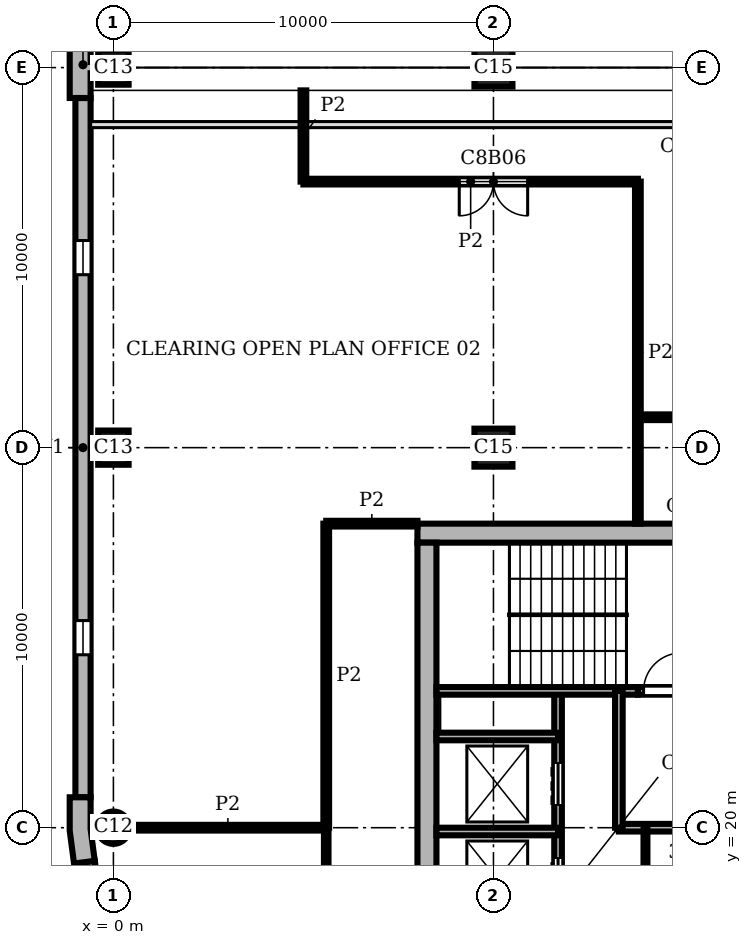
"""IFC4 building model, lengths in metres.
Left out: names, types, materials, properties, quantities, classifications, styles, units other than length and angle.
Written with IfcOpenShell. Run it as: python <this file> out.ifc"""

import sys

from ifc_helpers import new_model, si_unit, direction, frame, frame_2d, origin, origin_2d, place, context, subcontext, project, spatial, polyline, rectangle, circle, outline, extrude, element, fill, save


model = new_model("IFC4")
c1 = context("Model", 3, precision=1e-05, world=origin(), true_north=direction((0.0, 1.0)))
c2 = subcontext(c1, "Body", "Model", "MODEL_VIEW")
j1 = project(units=[si_unit("LENGTHUNIT", "METRE"), si_unit("PLANEANGLEUNIT", "RADIAN")], contexts=[c1])
p1 = place(None, origin())
s1 = spatial("IfcSite", under=j1, at=p1, CompositionType="ELEMENT")
p2 = place(p1, origin())
s2 = spatial("IfcBuilding", under=s1, at=p2, CompositionType="ELEMENT")
p3 = place(p2, frame((0.0, 0.0, 329.4)))
s3 = spatial("IfcBuildingStorey", under=s2, at=p3, CompositionType="ELEMENT", Elevation=329.4)
for number, where, z_axis, x_axis in (
    (1, (0.0, 40.0, 0.0), (0.0, 0.0, 1.0), (0.0, 1.0, 0.0)),
    (2, (0.0, 30.0, 0.0), (0.0, 0.0, 1.0), (0.0, 1.0, 0.0)),
):
    element("IfcColumn", number, at=place(p3, frame(where, z_axis=z_axis, x_axis=x_axis)), inside=s3, PredefinedType="COLUMN", context=c2, shape_type="SweptSolid", body=[
        extrude(rectangle(XDim=0.9, YDim=0.8, at=origin_2d()), origin(), (0.0, 0.0, 1.0), 3.9),
    ])
p4 = place(p3, frame((0.0, 20.0, 0.0), z_axis=(0.0, 0.0, 1.0), x_axis=(1.0, 0.0, 0.0)))
e3 = element("IfcColumn", 3, at=p4, inside=s3, PredefinedType="COLUMN", context=c2, shape_type="SweptSolid", body=[
    extrude(circle(Radius=0.425, at=origin_2d()), origin(), (0.0, 0.0, 1.0), 3.9),
])
for number, where, z_axis, x_axis in (
    (4, (10.0, 30.0, 0.0), (0.0, 0.0, 1.0), (1.0, 0.0, 0.0)),
    (5, (10.0, 40.0, 0.0), (0.0, 0.0, 1.0), (1.0, 0.0, 0.0)),
):
    element("IfcColumn", number, at=place(p3, frame(where, z_axis=z_axis, x_axis=x_axis)), inside=s3, PredefinedType="COLUMN", context=c2, shape_type="SweptSolid", body=[
        extrude(rectangle(XDim=1.0, YDim=1.0, at=origin_2d()), origin(), (0.0, 0.0, 1.0), 3.9),
    ])
p5 = place(p3, frame((28.0, 27.75, 0.0), z_axis=(0.0, 0.0, 1.0), x_axis=(-1.0, 0.0, 0.0)))
e6 = element("IfcWall", 6, at=p5, inside=s3, PredefinedType="SHEAR", context=c2, shape_type="SweptSolid", body=[
    extrude(rectangle(XDim=20.0, YDim=0.5, at=frame_2d((10.0, 0.0))), origin(), (0.0, 0.0, 1.0), 3.9),
])
p6 = place(p3, frame((8.25, 27.5, 0.0), z_axis=(0.0, 0.0, 1.0), x_axis=(0.0, -1.0, 0.0)))
e7 = element("IfcWall", 7, at=p6, inside=s3, PredefinedType="SHEAR", context=c2, shape_type="SweptSolid", body=[
    extrude(rectangle(XDim=19.0, YDim=0.5, at=frame_2d((9.5, 0.0))), origin(), (0.0, 0.0, 1.0), 3.9),
])
p7 = place(p3, origin())
e8 = element("IfcWall", 8, at=p7, inside=s3, PredefinedType="SOLIDWALL", context=c2, shape_type="SweptSolid", body=[
    extrude(outline(polyline([(-0.6, 39.2), (-0.6, 39.85), (-0.45, 39.85), (-0.45, 40.15), (-0.6, 40.15), (-0.6, 40.8), (-1.0, 40.8), (-1.15, 40.8), (-1.15, 40.0), (-1.15, 39.2), (-1.0, 39.2), (-0.6, 39.2)])), origin(), (0.0, 0.0, 1.0), 3.9),
])
e9 = element("IfcWall", 9, at=p7, inside=s3, PredefinedType="SOLIDWALL", context=c2, shape_type="SweptSolid", body=[
    extrude(outline(polyline([(-1.0, 20.8), (-1.15, 20.8), (-1.15, 19.925), (-1.036, 19.057), (-0.887, 19.076), (-0.49, 19.128), (-0.6, 19.961), (-0.6, 20.8), (-1.0, 20.8)])), origin(), (0.0, 0.0, 1.0), 3.9),
])
p8 = place(p3, frame((-0.8, 39.2, 0.0), z_axis=(0.0, 0.0, 1.0), x_axis=(0.0, -1.0, 0.0)))
e10 = element("IfcWall", 10, at=p8, inside=s3, PredefinedType="SOLIDWALL", context=c2, shape_type="SweptSolid", body=[
    extrude(rectangle(XDim=18.4, YDim=0.4, at=frame_2d((9.2, 0.0))), origin(), (0.0, 0.0, 1.0), 3.9),
])
p9 = place(p8, frame((3.75, 0.0, 0.9)))
e11 = element("IfcOpeningElement", 11, at=p9, cuts=e10, PredefinedType="OPENING", context=c2, shape_type="SweptSolid", body=[
    extrude(rectangle(XDim=0.9, YDim=2.35, at=frame_2d((0.45, 1.175))), frame((0.0, 0.21, 0.0), z_axis=(0.0, -1.0, 0.0), x_axis=(1.0, 0.0, 0.0)), (0.0, 0.0, 1.0), 0.42),
])
p10 = place(p8, frame((13.75, 0.0, 0.9)))
e12 = element("IfcOpeningElement", 12, at=p10, cuts=e10, PredefinedType="OPENING", context=c2, shape_type="SweptSolid", body=[
    extrude(rectangle(XDim=0.9, YDim=2.35, at=frame_2d((0.45, 1.175))), frame((0.0, 0.21, 0.0), z_axis=(0.0, -1.0, 0.0), x_axis=(1.0, 0.0, 0.0)), (0.0, 0.0, 1.0), 0.42),
])
p11 = place(p3, frame((-0.689, 19.102, 0.0), z_axis=(0.0, 0.0, 1.0), x_axis=(0.130514280502, -0.991446429508, 0.0)))
e13 = element("IfcWall", 13, at=p11, inside=s3, PredefinedType="SOLIDWALL", context=c2, shape_type="SweptSolid", body=[
    extrude(rectangle(XDim=4.121, YDim=0.4, at=frame_2d((2.061, 0.0))), origin(), (0.0, 0.0, 1.0), 3.9),
])
p12 = place(p11, frame((1.611, 0.0, 0.9)))
e14 = element("IfcOpeningElement", 14, at=p12, cuts=e13, PredefinedType="OPENING", context=c2, shape_type="SweptSolid", body=[
    extrude(rectangle(XDim=0.9, YDim=2.35, at=frame_2d((0.45, 1.175))), frame((0.0, 0.21, 0.0), z_axis=(0.0, -1.0, 0.0), x_axis=(1.0, 0.0, 0.0)), (0.0, 0.0, 1.0), 0.42),
])
p13 = place(p3, frame((8.5, 19.9, 0.0), z_axis=(0.0, 0.0, 1.0), x_axis=(1.0, 0.0, 0.0)))
e15 = element("IfcWall", 15, at=p13, inside=s3, PredefinedType="SHEAR", context=c2, shape_type="SweptSolid", body=[
    extrude(rectangle(XDim=3.2, YDim=0.2, at=frame_2d((1.6, 0.0))), origin(), (0.0, 0.0, 1.0), 3.45),
])
p14 = place(p3, frame((13.3, 20.0, 0.0), z_axis=(0.0, 0.0, 1.0), x_axis=(1.0, 0.0, 0.0)))
e16 = element("IfcWall", 16, at=p14, inside=s3, PredefinedType="SHEAR", context=c2, shape_type="SweptSolid", body=[
    extrude(rectangle(XDim=4.7, YDim=0.2, at=frame_2d((2.35, 0.0))), origin(), (0.0, 0.0, 1.0), 3.45),
])
p15 = place(p3, frame((8.5, 22.4, 0.0), z_axis=(0.0, 0.0, 1.0), x_axis=(1.0, 0.0, 0.0)))
e17 = element("IfcWall", 17, at=p15, inside=s3, PredefinedType="SHEAR", context=c2, shape_type="SweptSolid", body=[
    extrude(rectangle(XDim=3.2, YDim=0.2, at=frame_2d((1.6, 0.0))), origin(), (0.0, 0.0, 1.0), 3.45),
])
p16 = place(p3, frame((8.5, 23.6, 0.0), z_axis=(0.0, 0.0, 1.0), x_axis=(1.0, 0.0, 0.0)))
e18 = element("IfcWall", 18, at=p16, inside=s3, PredefinedType="SHEAR", context=c2, shape_type="SweptSolid", body=[
    extrude(rectangle(XDim=5.3, YDim=0.2, at=frame_2d((2.65, 0.0))), origin(), (0.0, 0.0, 1.0), 3.45),
])
p17 = place(p3, frame((13.8, 23.6, 0.0), z_axis=(0.0, 0.0, 1.0), x_axis=(1.0, 0.0, 0.0)))
e19 = element("IfcWall", 19, at=p17, inside=s3, PredefinedType="SHEAR", context=c2, shape_type="SweptSolid", body=[
    extrude(rectangle(XDim=13.7, YDim=0.2, at=frame_2d((6.85, 0.0))), origin(), (0.0, 0.0, 1.0), 3.45),
])
p18 = place(p17, frame((2.4, 0.0, 0.0)))
e20 = element("IfcOpeningElement", 20, at=p18, cuts=e19, PredefinedType="OPENING", context=c2, shape_type="SweptSolid", body=[
    extrude(rectangle(XDim=1.1, YDim=2.1, at=frame_2d((0.55, 1.05))), frame((0.0, 0.11, 0.0), z_axis=(0.0, -1.0, 0.0), x_axis=(1.0, 0.0, 0.0)), (0.0, 0.0, 1.0), 0.22),
])
p19 = place(p17, frame((4.9, 0.0, 0.0)))
e21 = element("IfcOpeningElement", 21, at=p19, cuts=e19, PredefinedType="OPENING", context=c2, shape_type="SweptSolid", body=[
    extrude(rectangle(XDim=1.1, YDim=2.1, at=frame_2d((0.55, 1.05))), frame((0.0, 0.11, 0.0), z_axis=(0.0, -1.0, 0.0), x_axis=(1.0, 0.0, 0.0)), (0.0, 0.0, 1.0), 0.22),
])
p20 = place(p17, frame((0.15, 0.0, 0.0)))
e22 = element("IfcOpeningElement", 22, at=p20, cuts=e19, PredefinedType="OPENING", context=c2, shape_type="SweptSolid", body=[
    extrude(rectangle(XDim=1.0, YDim=2.1, at=frame_2d((0.5, 1.05))), frame((0.0, 0.11, 0.0), z_axis=(0.0, -1.0, 0.0), x_axis=(1.0, 0.0, 0.0)), (0.0, 0.0, 1.0), 0.22),
])
p21 = place(p3, frame((11.7, 12.4, 0.0), z_axis=(0.0, 0.0, 1.0), x_axis=(0.0, 1.0, 0.0)))
e23 = element("IfcWall", 23, at=p21, inside=s3, PredefinedType="SHEAR", context=c2, shape_type="SweptSolid", body=[
    extrude(rectangle(XDim=11.2, YDim=0.2, at=frame_2d((5.6, 0.0))), origin(), (0.0, 0.0, 1.0), 3.45),
])
p22 = place(p21, frame((0.7, 0.0, 0.0)))
e24 = element("IfcOpeningElement", 24, at=p22, cuts=e23, PredefinedType="OPENING", context=c2, shape_type="SweptSolid", body=[
    extrude(rectangle(XDim=1.1, YDim=2.1, at=frame_2d((0.55, 1.05))), frame((0.0, 0.11, 0.0), z_axis=(0.0, -1.0, 0.0), x_axis=(1.0, 0.0, 0.0)), (0.0, 0.0, 1.0), 0.22),
])
p23 = place(p21, frame((3.2, 0.0, 0.0)))
e25 = element("IfcOpeningElement", 25, at=p23, cuts=e23, PredefinedType="OPENING", context=c2, shape_type="SweptSolid", body=[
    extrude(rectangle(XDim=1.1, YDim=2.1, at=frame_2d((0.55, 1.05))), frame((0.0, 0.11, 0.0), z_axis=(0.0, -1.0, 0.0), x_axis=(1.0, 0.0, 0.0)), (0.0, 0.0, 1.0), 0.22),
])
p24 = place(p21, frame((5.7, 0.0, 0.0)))
e26 = element("IfcOpeningElement", 26, at=p24, cuts=e23, PredefinedType="OPENING", context=c2, shape_type="SweptSolid", body=[
    extrude(rectangle(XDim=1.1, YDim=2.1, at=frame_2d((0.55, 1.05))), frame((0.0, 0.11, 0.0), z_axis=(0.0, -1.0, 0.0), x_axis=(1.0, 0.0, 0.0)), (0.0, 0.0, 1.0), 0.22),
])
p25 = place(p21, frame((8.2, 0.0, 0.0)))
e27 = element("IfcOpeningElement", 27, at=p25, cuts=e23, PredefinedType="OPENING", context=c2, shape_type="SweptSolid", body=[
    extrude(rectangle(XDim=1.1, YDim=2.1, at=frame_2d((0.55, 1.05))), frame((0.0, 0.11, 0.0), z_axis=(0.0, -1.0, 0.0), x_axis=(1.0, 0.0, 0.0)), (0.0, 0.0, 1.0), 0.22),
])
p26 = place(p3, frame((13.3, 20.0, 0.0), z_axis=(0.0, 0.0, 1.0), x_axis=(0.0, 1.0, 0.0)))
e28 = element("IfcWall", 28, at=p26, inside=s3, PredefinedType="SHEAR", context=c2, shape_type="SweptSolid", body=[
    extrude(rectangle(XDim=3.6, YDim=0.2, at=frame_2d((1.8, 0.0))), origin(), (0.0, 0.0, 1.0), 3.45),
])
p27 = place(p3, frame((14.0, 16.2, 0.0), z_axis=(0.0, 0.0, 1.0), x_axis=(0.0, 1.0, 0.0)))
e29 = element("IfcWall", 29, at=p27, inside=s3, PredefinedType="PARTITIONING", context=c2, shape_type="SweptSolid", body=[
    extrude(rectangle(XDim=3.8, YDim=0.1, at=frame_2d((1.9, 0.0))), origin(), (0.0, 0.0, 1.0), 3.45),
])
p28 = place(p3, frame((5.0, 37.0, 0.0), z_axis=(0.0, 0.0, 1.0), x_axis=(0.0, 1.0, 0.0)))
e30 = element("IfcWall", 30, at=p28, inside=s3, PredefinedType="PARTITIONING", context=c2, shape_type="SweptSolid", body=[
    extrude(rectangle(XDim=2.4, YDim=0.15, at=frame_2d((1.2, 0.0))), origin(), (0.0, 0.0, 1.0), 3.45),
])
p29 = place(p3, frame((5.6, 20.0, 0.0), z_axis=(0.0, 0.0, 1.0), x_axis=(0.0, 1.0, 0.0)))
e31 = element("IfcWall", 31, at=p29, inside=s3, PredefinedType="PARTITIONING", context=c2, shape_type="SweptSolid", body=[
    extrude(rectangle(XDim=8.0, YDim=0.15, at=frame_2d((4.0, 0.0))), origin(), (0.0, 0.0, 1.0), 3.45),
])
p30 = place(p3, frame((13.8, 28.0, 0.0), z_axis=(0.0, 0.0, 1.0), x_axis=(0.0, 1.0, 0.0)))
e32 = element("IfcWall", 32, at=p30, inside=s3, PredefinedType="PARTITIONING", context=c2, shape_type="SweptSolid", body=[
    extrude(rectangle(XDim=9.0, YDim=0.15, at=frame_2d((4.5, 0.0))), origin(), (0.0, 0.0, 1.0), 3.45),
])
p31 = place(p3, frame((0.425, 20.0, 0.0), z_axis=(0.0, 0.0, 1.0), x_axis=(1.0, 0.0, 0.0)))
e33 = element("IfcWall", 33, at=p31, inside=s3, PredefinedType="PARTITIONING", context=c2, shape_type="SweptSolid", body=[
    extrude(rectangle(XDim=5.175, YDim=0.15, at=frame_2d((2.587, 0.0))), origin(), (0.0, 0.0, 1.0), 3.45),
])
p32 = place(p3, frame((5.6, 28.0, 0.0), z_axis=(0.0, 0.0, 1.0), x_axis=(1.0, 0.0, 0.0)))
e34 = element("IfcWall", 34, at=p32, inside=s3, PredefinedType="PARTITIONING", context=c2, shape_type="SweptSolid", body=[
    extrude(rectangle(XDim=2.4, YDim=0.15, at=frame_2d((1.2, 0.0))), origin(), (0.0, 0.0, 1.0), 3.45),
])
p33 = place(p3, frame((13.802, 30.8, 0.0), z_axis=(0.0, 0.0, 1.0), x_axis=(1.0, 0.0, 0.0)))
e35 = element("IfcWall", 35, at=p33, inside=s3, PredefinedType="PARTITIONING", context=c2, shape_type="SweptSolid", body=[
    extrude(rectangle(XDim=16.798, YDim=0.15, at=frame_2d((8.399, 0.0))), origin(), (0.0, 0.0, 1.0), 3.45),
])
p34 = place(p33, frame((7.85, 0.0, 0.0)))
e36 = element("IfcOpeningElement", 36, at=p34, cuts=e35, PredefinedType="OPENING", context=c2, shape_type="SweptSolid", body=[
    extrude(rectangle(XDim=1.0, YDim=2.1, at=frame_2d((0.5, 1.05))), frame((0.0, 0.085, 0.0), z_axis=(0.0, -1.0, 0.0), x_axis=(1.0, 0.0, 0.0)), (0.0, 0.0, 1.0), 0.17),
])
p35 = place(p3, frame((5.0, 37.0, 0.0), z_axis=(0.0, 0.0, 1.0), x_axis=(1.0, 0.0, 0.0)))
e37 = element("IfcWall", 37, at=p35, inside=s3, PredefinedType="PARTITIONING", context=c2, shape_type="SweptSolid", body=[
    extrude(rectangle(XDim=8.8, YDim=0.15, at=frame_2d((4.4, 0.0))), origin(), (0.0, 0.0, 1.0), 3.45),
])
p36 = place(p35, frame((4.1, 0.0, 0.0)))
e38 = element("IfcOpeningElement", 38, at=p36, cuts=e37, PredefinedType="OPENING", context=c2, shape_type="SweptSolid", body=[
    extrude(rectangle(XDim=1.8, YDim=2.1, at=frame_2d((0.9, 1.05))), frame((0.0, 0.085, 0.0), z_axis=(0.0, -1.0, 0.0), x_axis=(1.0, 0.0, 0.0)), (0.0, 0.0, 1.0), 0.17),
])
p37 = place(p3, frame((5.6, 15.0, 0.0), z_axis=(0.0, 0.0, 1.0), x_axis=(0.0, 1.0, 0.0)))
e39 = element("IfcWall", 39, at=p37, inside=s3, PredefinedType="PARTITIONING", context=c2, shape_type="SweptSolid", body=[
    extrude(rectangle(XDim=5.0, YDim=0.12, at=frame_2d((2.5, 0.0))), origin(), (0.0, 0.0, 1.0), 3.45),
])
p38 = place(p37, frame((1.6, 0.0, 0.0)))
e40 = element("IfcOpeningElement", 40, at=p38, cuts=e39, PredefinedType="OPENING", context=c2, shape_type="SweptSolid", body=[
    extrude(rectangle(XDim=1.0, YDim=2.1, at=frame_2d((0.5, 1.05))), frame((0.0, 0.07, 0.0), z_axis=(0.0, -1.0, 0.0), x_axis=(1.0, 0.0, 0.0)), (0.0, 0.0, 1.0), 0.14),
])
p39 = place(p9, origin())
e41 = element("IfcWindow", 41, at=p39, inside=s3, PartitioningType="SINGLE_PANEL", PredefinedType="WINDOW", context=c2, shape_type="SweptSolid", body=[
    extrude(rectangle(XDim=0.9, YDim=2.35, at=frame_2d((0.45, 1.175))), frame((0.0, 0.16, 0.0), z_axis=(0.0, -1.0, 0.0), x_axis=(1.0, 0.0, 0.0)), (0.0, 0.0, 1.0), 0.06),
])
fill(e11, e41)
p40 = place(p10, origin())
e42 = element("IfcWindow", 42, at=p40, inside=s3, PartitioningType="SINGLE_PANEL", PredefinedType="WINDOW", context=c2, shape_type="SweptSolid", body=[
    extrude(rectangle(XDim=0.9, YDim=2.35, at=frame_2d((0.45, 1.175))), frame((0.0, 0.16, 0.0), z_axis=(0.0, -1.0, 0.0), x_axis=(1.0, 0.0, 0.0)), (0.0, 0.0, 1.0), 0.06),
])
fill(e12, e42)
p41 = place(p24, origin())
e43 = element("IfcDoor", 43, at=p41, inside=s3, OperationType="DOUBLE_DOOR_SLIDING", PredefinedType="DOOR", context=c2, shape_type="SweptSolid", body=[
    extrude(rectangle(XDim=1.1, YDim=2.1, at=frame_2d((0.55, 1.05))), frame((0.0, 0.025, 0.0), z_axis=(0.0, -1.0, 0.0), x_axis=(1.0, 0.0, 0.0)), (0.0, 0.0, 1.0), 0.05),
])
fill(e26, e43)
p42 = place(p25, origin())
e44 = element("IfcDoor", 44, at=p42, inside=s3, OperationType="DOUBLE_DOOR_SLIDING", PredefinedType="DOOR", context=c2, shape_type="SweptSolid", body=[
    extrude(rectangle(XDim=1.1, YDim=2.1, at=frame_2d((0.55, 1.05))), frame((0.0, 0.025, 0.0), z_axis=(0.0, -1.0, 0.0), x_axis=(1.0, 0.0, 0.0)), (0.0, 0.0, 1.0), 0.05),
])
fill(e27, e44)
p43 = place(p20, origin())
e45 = element("IfcDoor", 45, at=p43, inside=s3, OperationType="SINGLE_SWING_RIGHT", PredefinedType="DOOR", context=c2, shape_type="SweptSolid", body=[
    extrude(rectangle(XDim=1.0, YDim=2.1, at=frame_2d((0.5, 1.05))), frame((0.0, 0.025, 0.0), z_axis=(0.0, -1.0, 0.0), x_axis=(1.0, 0.0, 0.0)), (0.0, 0.0, 1.0), 0.05),
])
fill(e22, e45)
p44 = place(p36, frame((1.8, 0.0, 0.0), z_axis=(0.0, 0.0, 1.0), x_axis=(-1.0, 0.0, 0.0)))
e46 = element("IfcDoor", 46, at=p44, inside=s3, OperationType="DOUBLE_DOOR_SINGLE_SWING", PredefinedType="DOOR", context=c2, shape_type="SweptSolid", body=[
    extrude(rectangle(XDim=1.8, YDim=2.1, at=frame_2d((0.9, 1.05))), frame((0.0, 0.025, 0.0), z_axis=(0.0, -1.0, 0.0), x_axis=(1.0, 0.0, 0.0)), (0.0, 0.0, 1.0), 0.05),
])
fill(e38, e46)
save(model, sys.argv[1])
